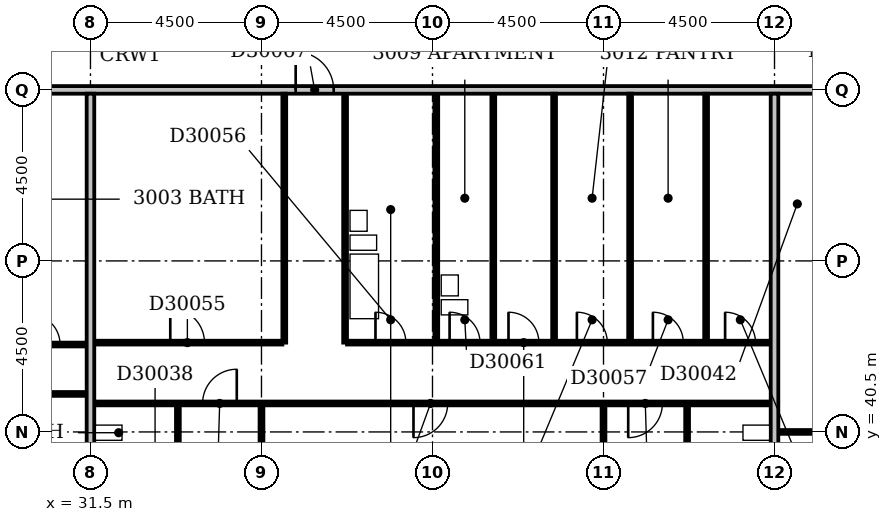
"""IFC4 building model, lengths in metres.
Left out: names, types, materials, properties, quantities, classifications, styles, units other than length and angle.
Written with IfcOpenShell. Run it as: python <this file> out.ifc"""

import sys

from ifc_helpers import new_model, si_unit, direction, frame, frame_2d, origin, place, context, subcontext, project, spatial, rectangle, extrude, element, fill, save


model = new_model("IFC4")
c1 = context("Model", 3, precision=1e-05, world=origin(), true_north=direction((0.0, 1.0)))
c2 = subcontext(c1, "Body", "Model", "MODEL_VIEW")
j1 = project(units=[si_unit("LENGTHUNIT", "METRE"), si_unit("PLANEANGLEUNIT", "RADIAN")], contexts=[c1])
p1 = place(None, origin())
s1 = spatial("IfcSite", under=j1, at=p1, CompositionType="ELEMENT")
p2 = place(p1, origin())
s2 = spatial("IfcBuilding", under=s1, at=p2, CompositionType="ELEMENT")
p3 = place(p2, frame((0.0, 0.0, 123.2)))
s3 = spatial("IfcBuildingStorey", under=s2, at=p3, CompositionType="ELEMENT", Elevation=123.2)
p4 = place(p3, frame((31.5, 36.5, 0.0), z_axis=(0.0, 0.0, 1.0), x_axis=(0.0, 1.0, 0.0)))
e1 = element("IfcWall", 1, at=p4, inside=s3, PredefinedType="PARTITIONING", context=c2, shape_type="SweptSolid", body=[
    extrude(rectangle(XDim=12.9, YDim=0.2, at=frame_2d((6.45, 0.0))), origin(), (0.0, 0.0, 1.0), 3.3),
])
p5 = place(p3, frame((36.0, 36.5, 0.0), z_axis=(0.0, 0.0, 1.0), x_axis=(0.0, 1.0, 0.0)))
e2 = element("IfcWall", 2, at=p5, inside=s3, PredefinedType="PARTITIONING", context=c2, shape_type="SweptSolid", body=[
    extrude(rectangle(XDim=4.7, YDim=0.1, at=frame_2d((2.35, 0.0))), origin(), (0.0, 0.0, 1.0), 2.4),
])
p6 = place(p3, frame((45.0, 36.5, 0.0), z_axis=(0.0, 0.0, 1.0), x_axis=(0.0, 1.0, 0.0)))
e3 = element("IfcWall", 3, at=p6, inside=s3, PredefinedType="PARTITIONING", context=c2, shape_type="SweptSolid", body=[
    extrude(rectangle(XDim=4.7, YDim=0.1, at=frame_2d((2.35, 0.0))), origin(), (0.0, 0.0, 1.0), 2.6),
])
p7 = place(p3, frame((49.5, 36.5, 0.0), z_axis=(0.0, 0.0, 1.0), x_axis=(0.0, 1.0, 0.0)))
e4 = element("IfcWall", 4, at=p7, inside=s3, PredefinedType="PARTITIONING", context=c2, shape_type="SweptSolid", body=[
    extrude(rectangle(XDim=12.9, YDim=0.2, at=frame_2d((6.45, 0.0))), origin(), (0.0, 0.0, 1.0), 3.3),
])
p8 = place(p3, frame((33.8, 38.35, 0.0), z_axis=(0.0, 0.0, 1.0), x_axis=(0.0, 1.0, 0.0)))
e5 = element("IfcWall", 5, at=p8, inside=s3, PredefinedType="PLUMBINGWALL", context=c2, shape_type="SweptSolid", body=[
    extrude(rectangle(XDim=2.85, YDim=0.1, at=frame_2d((1.425, 0.0))), origin(), (0.0, 0.0, 1.0), 3.3),
])
p9 = place(p8, frame((1.05, 0.0, 0.0)))
e6 = element("IfcOpeningElement", 6, at=p9, cuts=e5, PredefinedType="OPENING", context=c2, shape_type="SweptSolid", body=[
    extrude(rectangle(XDim=0.8, YDim=2.1, at=frame_2d((0.4, 1.05))), frame((0.0, 0.062, 0.0), z_axis=(0.0, -1.0, 0.0), x_axis=(1.0, 0.0, 0.0)), (0.0, 0.0, 1.0), 0.124),
])
p10 = place(p3, frame((47.2, 38.35, 0.0), z_axis=(0.0, 0.0, 1.0), x_axis=(0.0, 1.0, 0.0)))
e7 = element("IfcWall", 7, at=p10, inside=s3, PredefinedType="PLUMBINGWALL", context=c2, shape_type="SweptSolid", body=[
    extrude(rectangle(XDim=2.85, YDim=0.1, at=frame_2d((1.425, 0.0))), origin(), (0.0, 0.0, 1.0), 3.3),
])
p11 = place(p10, frame((1.05, 0.0, 0.0)))
e8 = element("IfcOpeningElement", 8, at=p11, cuts=e7, PredefinedType="OPENING", context=c2, shape_type="SweptSolid", body=[
    extrude(rectangle(XDim=0.8, YDim=2.1, at=frame_2d((0.4, 1.05))), frame((0.0, 0.062, 0.0), z_axis=(0.0, -1.0, 0.0), x_axis=(1.0, 0.0, 0.0)), (0.0, 0.0, 1.0), 0.124),
])
p12 = place(p3, frame((49.6, 40.5, 0.0), z_axis=(0.0, 0.0, 1.0), x_axis=(1.0, 0.0, 0.0)))
e9 = element("IfcWall", 9, at=p12, inside=s3, PredefinedType="PARTITIONING", context=c2, shape_type="SweptSolid", body=[
    extrude(rectangle(XDim=4.3, YDim=0.1, at=frame_2d((2.15, 0.0))), origin(), (0.0, 0.0, 1.0), 3.3),
])
p13 = place(p12, frame((1.7, 0.0, 0.0)))
e10 = element("IfcOpeningElement", 10, at=p13, cuts=e9, PredefinedType="OPENING", context=c2, shape_type="SweptSolid", body=[
    extrude(rectangle(XDim=0.9, YDim=2.1, at=frame_2d((0.45, 1.05))), frame((0.0, 0.062, 0.0), z_axis=(0.0, -1.0, 0.0), x_axis=(1.0, 0.0, 0.0)), (0.0, 0.0, 1.0), 0.124),
])
p14 = place(p3, frame((31.6, 41.25, 0.0), z_axis=(0.0, 0.0, 1.0), x_axis=(1.0, 0.0, 0.0)))
e11 = element("IfcWall", 11, at=p14, inside=s3, PredefinedType="PARTITIONING", context=c2, shape_type="SweptSolid", body=[
    extrude(rectangle(XDim=17.8, YDim=0.1, at=frame_2d((8.9, 0.0))), origin(), (0.0, 0.0, 1.0), 3.3),
])
p15 = place(p14, frame((2.85, 0.0, 0.0)))
e12 = element("IfcOpeningElement", 12, at=p15, cuts=e11, PredefinedType="OPENING", context=c2, shape_type="SweptSolid", body=[
    extrude(rectangle(XDim=0.9, YDim=2.1, at=frame_2d((0.45, 1.05))), frame((0.0, 0.062, 0.0), z_axis=(0.0, -1.0, 0.0), x_axis=(1.0, 0.0, 0.0)), (0.0, 0.0, 1.0), 0.124),
])
p16 = place(p14, frame((8.4, 0.0, 0.0)))
e13 = element("IfcOpeningElement", 13, at=p16, cuts=e11, PredefinedType="OPENING", context=c2, shape_type="SweptSolid", body=[
    extrude(rectangle(XDim=0.9, YDim=2.1, at=frame_2d((0.45, 1.05))), frame((0.0, 0.062, 0.0), z_axis=(0.0, -1.0, 0.0), x_axis=(1.0, 0.0, 0.0)), (0.0, 0.0, 1.0), 0.124),
])
p17 = place(p14, frame((14.05, 0.0, 0.0)))
e14 = element("IfcOpeningElement", 14, at=p17, cuts=e11, PredefinedType="OPENING", context=c2, shape_type="SweptSolid", body=[
    extrude(rectangle(XDim=0.9, YDim=2.1, at=frame_2d((0.45, 1.05))), frame((0.0, 0.062, 0.0), z_axis=(0.0, -1.0, 0.0), x_axis=(1.0, 0.0, 0.0)), (0.0, 0.0, 1.0), 0.124),
])
p18 = place(p3, frame((22.6, 41.5, 0.0), z_axis=(0.0, 0.0, 1.0), x_axis=(1.0, 0.0, 0.0)))
e15 = element("IfcWall", 15, at=p18, inside=s3, PredefinedType="PARTITIONING", context=c2, shape_type="SweptSolid", body=[
    extrude(rectangle(XDim=8.8, YDim=0.1, at=frame_2d((4.4, 0.0))), origin(), (0.0, 0.0, 1.0), 3.3),
])
p19 = place(p18, frame((1.7, 0.0, 0.0)))
e16 = element("IfcOpeningElement", 16, at=p19, cuts=e15, PredefinedType="OPENING", context=c2, shape_type="SweptSolid", body=[
    extrude(rectangle(XDim=0.9, YDim=2.1, at=frame_2d((0.45, 1.05))), frame((0.0, 0.062, 0.0), z_axis=(0.0, -1.0, 0.0), x_axis=(1.0, 0.0, 0.0)), (0.0, 0.0, 1.0), 0.124),
])
p20 = place(p18, frame((6.2, 0.0, 0.0)))
e17 = element("IfcOpeningElement", 17, at=p20, cuts=e15, PredefinedType="OPENING", context=c2, shape_type="SweptSolid", body=[
    extrude(rectangle(XDim=0.9, YDim=2.1, at=frame_2d((0.45, 1.05))), frame((0.0, 0.062, 0.0), z_axis=(0.0, -1.0, 0.0), x_axis=(1.0, 0.0, 0.0)), (0.0, 0.0, 1.0), 0.124),
])
p21 = place(p3, frame((24.15, 42.8, 0.0), z_axis=(0.0, 0.0, 1.0), x_axis=(1.0, 0.0, 0.0)))
e18 = element("IfcWall", 18, at=p21, inside=s3, PredefinedType="PARTITIONING", context=c2, shape_type="SweptSolid", body=[
    extrude(rectangle(XDim=7.25, YDim=0.1, at=frame_2d((3.625, 0.0))), origin(), (0.0, 0.0, 1.0), 3.3),
])
p22 = place(p21, frame((5.75, 0.0, 0.0)))
e19 = element("IfcOpeningElement", 19, at=p22, cuts=e18, PredefinedType="OPENING", context=c2, shape_type="SweptSolid", body=[
    extrude(rectangle(XDim=0.8, YDim=2.1, at=frame_2d((0.4, 1.05))), frame((0.0, 0.062, 0.0), z_axis=(0.0, -1.0, 0.0), x_axis=(1.0, 0.0, 0.0)), (0.0, 0.0, 1.0), 0.124),
])
p23 = place(p21, frame((2.0, 0.0, 0.0)))
e20 = element("IfcOpeningElement", 20, at=p23, cuts=e18, PredefinedType="OPENING", context=c2, shape_type="SweptSolid", body=[
    extrude(rectangle(XDim=0.9, YDim=2.1, at=frame_2d((0.45, 1.05))), frame((0.0, 0.062, 0.0), z_axis=(0.0, -1.0, 0.0), x_axis=(1.0, 0.0, 0.0)), (0.0, 0.0, 1.0), 0.124),
])
p24 = place(p3, frame((31.6, 42.85, 0.0), z_axis=(0.0, 0.0, 1.0), x_axis=(1.0, 0.0, 0.0)))
e21 = element("IfcWall", 21, at=p24, inside=s3, PredefinedType="PARTITIONING", context=c2, shape_type="SweptSolid", body=[
    extrude(rectangle(XDim=4.95, YDim=0.1, at=frame_2d((2.475, 0.0))), origin(), (0.0, 0.0, 1.0), 3.3),
])
p25 = place(p24, frame((2.0, 0.0, 0.0)))
e22 = element("IfcOpeningElement", 22, at=p25, cuts=e21, PredefinedType="OPENING", context=c2, shape_type="SweptSolid", body=[
    extrude(rectangle(XDim=0.9, YDim=2.1, at=frame_2d((0.45, 1.05))), frame((0.0, 0.062, 0.0), z_axis=(0.0, -1.0, 0.0), x_axis=(1.0, 0.0, 0.0)), (0.0, 0.0, 1.0), 0.124),
])
p26 = place(p3, frame((36.6, 42.85, 0.0), z_axis=(0.0, 0.0, 1.0), x_axis=(0.0, 1.0, 0.0)))
e23 = element("IfcWall", 23, at=p26, inside=s3, PredefinedType="PARTITIONING", context=c2, shape_type="SweptSolid", body=[
    extrude(rectangle(XDim=6.55, YDim=0.1, at=frame_2d((3.275, 0.0))), origin(), (0.0, 0.0, 1.0), 2.4),
])
p27 = place(p3, frame((38.2, 42.85, 0.0), z_axis=(0.0, 0.0, 1.0), x_axis=(0.0, 1.0, 0.0)))
e24 = element("IfcWall", 24, at=p27, inside=s3, PredefinedType="PLUMBINGWALL", context=c2, shape_type="SweptSolid", body=[
    extrude(rectangle(XDim=6.55, YDim=0.1, at=frame_2d((3.275, 0.0))), origin(), (0.0, 0.0, 1.0), 3.3),
])
p28 = place(p3, frame((38.25, 42.85, 0.0), z_axis=(0.0, 0.0, 1.0), x_axis=(1.0, 0.0, 0.0)))
e25 = element("IfcWall", 25, at=p28, inside=s3, PredefinedType="PARTITIONING", context=c2, shape_type="SweptSolid", body=[
    extrude(rectangle(XDim=11.15, YDim=0.1, at=frame_2d((5.575, 0.0))), origin(), (0.0, 0.0, 1.0), 3.3),
])
p29 = place(p28, frame((0.75, 0.0, 0.0)))
e26 = element("IfcOpeningElement", 26, at=p29, cuts=e25, PredefinedType="OPENING", context=c2, shape_type="SweptSolid", body=[
    extrude(rectangle(XDim=0.8, YDim=2.1, at=frame_2d((0.4, 1.05))), frame((0.0, 0.062, 0.0), z_axis=(0.0, -1.0, 0.0), x_axis=(1.0, 0.0, 0.0)), (0.0, 0.0, 1.0), 0.124),
])
p30 = place(p28, frame((8.05, 0.0, 0.0)))
e27 = element("IfcOpeningElement", 27, at=p30, cuts=e25, PredefinedType="OPENING", context=c2, shape_type="SweptSolid", body=[
    extrude(rectangle(XDim=0.8, YDim=2.1, at=frame_2d((0.4, 1.05))), frame((0.0, 0.062, 0.0), z_axis=(0.0, -1.0, 0.0), x_axis=(1.0, 0.0, 0.0)), (0.0, 0.0, 1.0), 0.124),
])
p31 = place(p28, frame((4.25, 0.0, 0.0)))
e28 = element("IfcOpeningElement", 28, at=p31, cuts=e25, PredefinedType="OPENING", context=c2, shape_type="SweptSolid", body=[
    extrude(rectangle(XDim=0.8, YDim=2.1, at=frame_2d((0.4, 1.05))), frame((0.0, 0.062, 0.0), z_axis=(0.0, -1.0, 0.0), x_axis=(1.0, 0.0, 0.0)), (0.0, 0.0, 1.0), 0.124),
])
p32 = place(p28, frame((6.05, 0.0, 0.0)))
e29 = element("IfcOpeningElement", 29, at=p32, cuts=e25, PredefinedType="OPENING", context=c2, shape_type="SweptSolid", body=[
    extrude(rectangle(XDim=0.8, YDim=2.1, at=frame_2d((0.4, 1.05))), frame((0.0, 0.062, 0.0), z_axis=(0.0, -1.0, 0.0), x_axis=(1.0, 0.0, 0.0)), (0.0, 0.0, 1.0), 0.124),
])
p33 = place(p28, frame((9.95, 0.0, 0.0)))
e30 = element("IfcOpeningElement", 30, at=p33, cuts=e25, PredefinedType="OPENING", context=c2, shape_type="SweptSolid", body=[
    extrude(rectangle(XDim=0.8, YDim=2.1, at=frame_2d((0.4, 1.05))), frame((0.0, 0.062, 0.0), z_axis=(0.0, -1.0, 0.0), x_axis=(1.0, 0.0, 0.0)), (0.0, 0.0, 1.0), 0.124),
])
p34 = place(p28, frame((2.7, 0.0, 0.0)))
e31 = element("IfcOpeningElement", 31, at=p34, cuts=e25, PredefinedType="OPENING", context=c2, shape_type="SweptSolid", body=[
    extrude(rectangle(XDim=0.8, YDim=2.1, at=frame_2d((0.4, 1.05))), frame((0.0, 0.062, 0.0), z_axis=(0.0, -1.0, 0.0), x_axis=(1.0, 0.0, 0.0)), (0.0, 0.0, 1.0), 0.124),
])
for number, where, z_axis, x_axis in (
    (32, (40.6, 42.9, 0.0), (0.0, 0.0, 1.0), (0.0, 1.0, 0.0)),
    (33, (42.1, 42.9, 0.0), (0.0, 0.0, 1.0), (0.0, 1.0, 0.0)),
):
    element("IfcWall", number, at=place(p3, frame(where, z_axis=z_axis, x_axis=x_axis)), inside=s3, PredefinedType="PLUMBINGWALL", context=c2, shape_type="SweptSolid", body=[
        extrude(rectangle(XDim=6.5, YDim=0.1, at=frame_2d((3.25, 0.0))), origin(), (0.0, 0.0, 1.0), 3.3),
    ])
p35 = place(p3, frame((43.7, 42.9, 0.0), z_axis=(0.0, 0.0, 1.0), x_axis=(0.0, 1.0, 0.0)))
e34 = element("IfcWall", 34, at=p35, inside=s3, PredefinedType="PARTITIONING", context=c2, shape_type="SweptSolid", body=[
    extrude(rectangle(XDim=6.5, YDim=0.1, at=frame_2d((3.25, 0.0))), origin(), (0.0, 0.0, 1.0), 3.3),
])
p36 = place(p3, frame((45.7, 42.9, 0.0), z_axis=(0.0, 0.0, 1.0), x_axis=(0.0, 1.0, 0.0)))
e35 = element("IfcWall", 35, at=p36, inside=s3, PredefinedType="PARTITIONING", context=c2, shape_type="SweptSolid", body=[
    extrude(rectangle(XDim=6.5, YDim=0.1, at=frame_2d((3.25, 0.0))), origin(), (0.0, 0.0, 1.0), 2.6),
])
p37 = place(p3, frame((47.7, 42.9, 0.0), z_axis=(0.0, 0.0, 1.0), x_axis=(0.0, 1.0, 0.0)))
e36 = element("IfcWall", 36, at=p37, inside=s3, PredefinedType="PARTITIONING", context=c2, shape_type="SweptSolid", body=[
    extrude(rectangle(XDim=6.5, YDim=0.1, at=frame_2d((3.25, 0.0))), origin(), (0.0, 0.0, 1.0), 3.3),
])
p38 = place(p3, frame((9.1, 49.5, 0.0), z_axis=(0.0, 0.0, 1.0), x_axis=(1.0, 0.0, 0.0)))
e37 = element("IfcWall", 37, at=p38, inside=s3, PredefinedType="PARTITIONING", context=c2, shape_type="SweptSolid", body=[
    extrude(rectangle(XDim=41.55, YDim=0.2, at=frame_2d((20.775, 0.0))), origin(), (0.0, 0.0, 1.0), 3.3),
])
p39 = place(p38, frame((13.7, 0.0, 0.0)))
e38 = element("IfcOpeningElement", 38, at=p39, cuts=e37, PredefinedType="OPENING", context=c2, shape_type="SweptSolid", body=[
    extrude(rectangle(XDim=1.0, YDim=2.1, at=frame_2d((0.5, 1.05))), frame((0.0, 0.112, 0.0), z_axis=(0.0, -1.0, 0.0), x_axis=(1.0, 0.0, 0.0)), (0.0, 0.0, 1.0), 0.224),
])
p40 = place(p38, frame((27.8, 0.0, 0.0)))
e39 = element("IfcOpeningElement", 39, at=p40, cuts=e37, PredefinedType="OPENING", context=c2, shape_type="SweptSolid", body=[
    extrude(rectangle(XDim=1.0, YDim=2.1, at=frame_2d((0.5, 1.05))), frame((0.0, 0.112, 0.0), z_axis=(0.0, -1.0, 0.0), x_axis=(1.0, 0.0, 0.0)), (0.0, 0.0, 1.0), 0.224),
])
p41 = place(p38, frame((8.4, 0.0, 0.0)))
e40 = element("IfcOpeningElement", 40, at=p41, cuts=e37, PredefinedType="OPENING", context=c2, shape_type="SweptSolid", body=[
    extrude(rectangle(XDim=0.9, YDim=2.1, at=frame_2d((0.45, 1.05))), frame((0.0, 0.112, 0.0), z_axis=(0.0, -1.0, 0.0), x_axis=(1.0, 0.0, 0.0)), (0.0, 0.0, 1.0), 0.224),
])
p42 = place(p15, frame((0.9, 0.0, 0.0), z_axis=(0.0, 0.0, 1.0), x_axis=(-1.0, 0.0, 0.0)))
e41 = element("IfcDoor", 41, at=p42, inside=s3, OperationType="SINGLE_SWING_LEFT", PredefinedType="DOOR", context=c2, shape_type="SweptSolid", body=[
    extrude(rectangle(XDim=0.9, YDim=2.1, at=frame_2d((0.45, 1.05))), frame((0.0, 0.025, 0.0), z_axis=(0.0, -1.0, 0.0), x_axis=(1.0, 0.0, 0.0)), (0.0, 0.0, 1.0), 0.05),
])
fill(e12, e41)
p43 = place(p16, frame((0.9, 0.0, 0.0), z_axis=(0.0, 0.0, 1.0), x_axis=(-1.0, 0.0, 0.0)))
e42 = element("IfcDoor", 42, at=p43, inside=s3, OperationType="SINGLE_SWING_RIGHT", PredefinedType="DOOR", context=c2, shape_type="SweptSolid", body=[
    extrude(rectangle(XDim=0.9, YDim=2.1, at=frame_2d((0.45, 1.05))), frame((0.0, 0.025, 0.0), z_axis=(0.0, -1.0, 0.0), x_axis=(1.0, 0.0, 0.0)), (0.0, 0.0, 1.0), 0.05),
])
fill(e13, e42)
p44 = place(p17, frame((0.9, 0.0, 0.0), z_axis=(0.0, 0.0, 1.0), x_axis=(-1.0, 0.0, 0.0)))
e43 = element("IfcDoor", 43, at=p44, inside=s3, OperationType="SINGLE_SWING_RIGHT", PredefinedType="DOOR", context=c2, shape_type="SweptSolid", body=[
    extrude(rectangle(XDim=0.9, YDim=2.1, at=frame_2d((0.45, 1.05))), frame((0.0, 0.025, 0.0), z_axis=(0.0, -1.0, 0.0), x_axis=(1.0, 0.0, 0.0)), (0.0, 0.0, 1.0), 0.05),
])
fill(e14, e43)
p45 = place(p22, origin())
e44 = element("IfcDoor", 44, at=p45, inside=s3, OperationType="SINGLE_SWING_LEFT", PredefinedType="DOOR", context=c2, shape_type="SweptSolid", body=[
    extrude(rectangle(XDim=0.8, YDim=2.1, at=frame_2d((0.4, 1.05))), frame((0.0, 0.025, 0.0), z_axis=(0.0, -1.0, 0.0), x_axis=(1.0, 0.0, 0.0)), (0.0, 0.0, 1.0), 0.05),
])
fill(e19, e44)
p46 = place(p25, origin())
e45 = element("IfcDoor", 45, at=p46, inside=s3, OperationType="SINGLE_SWING_LEFT", PredefinedType="DOOR", context=c2, shape_type="SweptSolid", body=[
    extrude(rectangle(XDim=0.9, YDim=2.1, at=frame_2d((0.45, 1.05))), frame((0.0, 0.025, 0.0), z_axis=(0.0, -1.0, 0.0), x_axis=(1.0, 0.0, 0.0)), (0.0, 0.0, 1.0), 0.05),
])
fill(e22, e45)
p47 = place(p29, origin())
e46 = element("IfcDoor", 46, at=p47, inside=s3, OperationType="SINGLE_SWING_LEFT", PredefinedType="DOOR", context=c2, shape_type="SweptSolid", body=[
    extrude(rectangle(XDim=0.8, YDim=2.1, at=frame_2d((0.4, 1.05))), frame((0.0, 0.025, 0.0), z_axis=(0.0, -1.0, 0.0), x_axis=(1.0, 0.0, 0.0)), (0.0, 0.0, 1.0), 0.05),
])
fill(e26, e46)
p48 = place(p30, origin())
e47 = element("IfcDoor", 47, at=p48, inside=s3, OperationType="SINGLE_SWING_LEFT", PredefinedType="DOOR", context=c2, shape_type="SweptSolid", body=[
    extrude(rectangle(XDim=0.8, YDim=2.1, at=frame_2d((0.4, 1.05))), frame((0.0, 0.025, 0.0), z_axis=(0.0, -1.0, 0.0), x_axis=(1.0, 0.0, 0.0)), (0.0, 0.0, 1.0), 0.05),
])
fill(e27, e47)
p49 = place(p31, origin())
e48 = element("IfcDoor", 48, at=p49, inside=s3, OperationType="SINGLE_SWING_LEFT", PredefinedType="DOOR", context=c2, shape_type="SweptSolid", body=[
    extrude(rectangle(XDim=0.8, YDim=2.1, at=frame_2d((0.4, 1.05))), frame((0.0, 0.025, 0.0), z_axis=(0.0, -1.0, 0.0), x_axis=(1.0, 0.0, 0.0)), (0.0, 0.0, 1.0), 0.05),
])
fill(e28, e48)
p50 = place(p32, origin())
e49 = element("IfcDoor", 49, at=p50, inside=s3, OperationType="SINGLE_SWING_LEFT", PredefinedType="DOOR", context=c2, shape_type="SweptSolid", body=[
    extrude(rectangle(XDim=0.8, YDim=2.1, at=frame_2d((0.4, 1.05))), frame((0.0, 0.025, 0.0), z_axis=(0.0, -1.0, 0.0), x_axis=(1.0, 0.0, 0.0)), (0.0, 0.0, 1.0), 0.05),
])
fill(e29, e49)
p51 = place(p33, origin())
e50 = element("IfcDoor", 50, at=p51, inside=s3, OperationType="SINGLE_SWING_LEFT", PredefinedType="DOOR", context=c2, shape_type="SweptSolid", body=[
    extrude(rectangle(XDim=0.8, YDim=2.1, at=frame_2d((0.4, 1.05))), frame((0.0, 0.025, 0.0), z_axis=(0.0, -1.0, 0.0), x_axis=(1.0, 0.0, 0.0)), (0.0, 0.0, 1.0), 0.05),
])
fill(e30, e50)
p52 = place(p34, origin())
e51 = element("IfcDoor", 51, at=p52, inside=s3, OperationType="SINGLE_SWING_LEFT", PredefinedType="DOOR", context=c2, shape_type="SweptSolid", body=[
    extrude(rectangle(XDim=0.8, YDim=2.1, at=frame_2d((0.4, 1.05))), frame((0.0, 0.025, 0.0), z_axis=(0.0, -1.0, 0.0), x_axis=(1.0, 0.0, 0.0)), (0.0, 0.0, 1.0), 0.05),
])
fill(e31, e51)
p53 = place(p40, origin())
e52 = element("IfcDoor", 52, at=p53, inside=s3, OperationType="SINGLE_SWING_LEFT", PredefinedType="DOOR", context=c2, shape_type="SweptSolid", body=[
    extrude(rectangle(XDim=1.0, YDim=2.1, at=frame_2d((0.5, 1.05))), frame((0.0, 0.025, 0.0), z_axis=(0.0, -1.0, 0.0), x_axis=(1.0, 0.0, 0.0)), (0.0, 0.0, 1.0), 0.05),
])
fill(e39, e52)
save(model, sys.argv[1])
